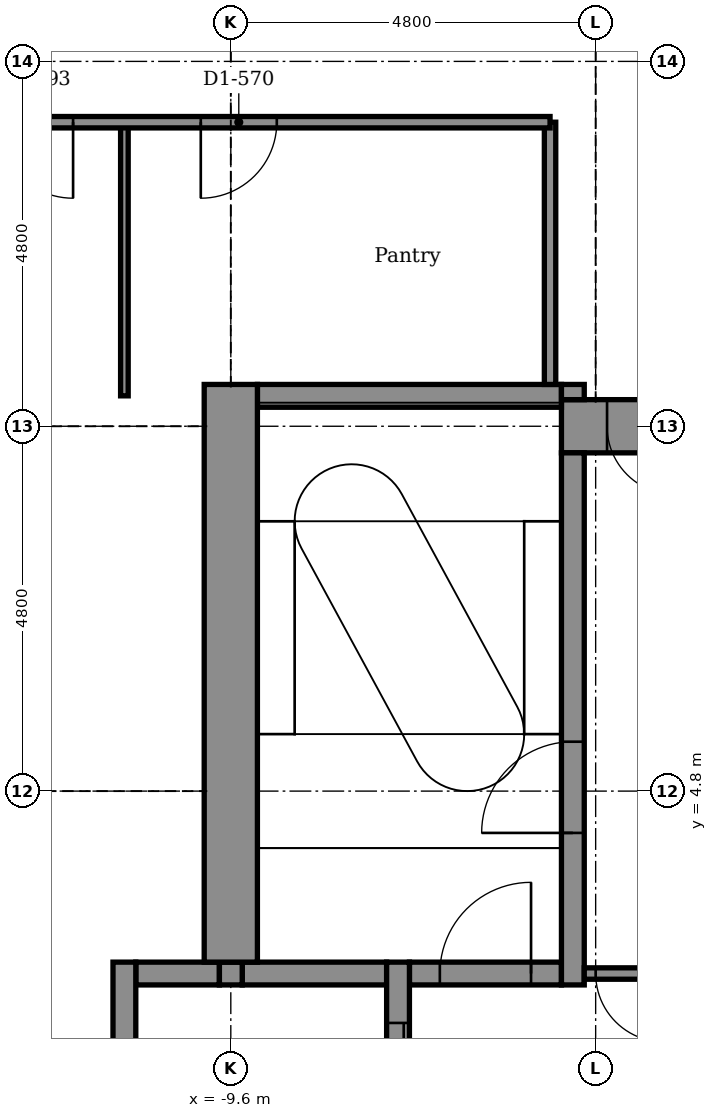
"""IFC4 building model, lengths in metres.
Left out: names, types, materials, properties, quantities, classifications, styles, units other than length and angle.
Written with IfcOpenShell. Run it as: python <this file> out.ifc"""

import sys

from ifc_helpers import new_model, si_unit, direction, frame, frame_2d, origin, place, context, subcontext, project, spatial, rectangle, extrude, element, fill, save


model = new_model("IFC4")
c1 = context("Model", 3, precision=1e-05, world=origin(), true_north=direction((0.0, 1.0)))
c2 = subcontext(c1, "Body", "Model", "MODEL_VIEW")
j1 = project(units=[si_unit("LENGTHUNIT", "METRE"), si_unit("PLANEANGLEUNIT", "RADIAN")], contexts=[c1])
p1 = place(None, origin())
s1 = spatial("IfcSite", under=j1, at=p1, CompositionType="ELEMENT")
p2 = place(p1, origin())
s2 = spatial("IfcBuilding", under=s1, at=p2, CompositionType="ELEMENT")
p3 = place(p2, frame((0.0, 0.0, 201.2)))
s3 = spatial("IfcBuildingStorey", under=s2, at=p3, CompositionType="ELEMENT", Elevation=201.2)
p4 = place(p3, frame((-10.85, 2.4, -0.15), z_axis=(0.0, 0.0, 1.0), x_axis=(1.0, 0.0, 0.0)))
e1 = element("IfcWall", 1, at=p4, inside=s3, PredefinedType="STANDARD", context=c2, shape_type="SweptSolid", body=[
    extrude(rectangle(XDim=1.1, YDim=0.3, at=frame_2d((0.55, 0.0))), origin(), (0.0, 0.0, 1.0), 3.9),
])
p5 = place(p3, frame((-9.45, 2.4, -0.15), z_axis=(0.0, 0.0, 1.0), x_axis=(1.0, 0.0, 0.0)))
e2 = element("IfcWall", 2, at=p5, inside=s3, PredefinedType="STANDARD", context=c2, shape_type="SweptSolid", body=[
    extrude(rectangle(XDim=1.9, YDim=0.3, at=frame_2d((0.95, 0.0))), origin(), (0.0, 0.0, 1.0), 3.9),
])
p6 = place(p3, frame((-7.25, 2.4, -0.15), z_axis=(0.0, 0.0, 1.0), x_axis=(1.0, 0.0, 0.0)))
e3 = element("IfcWall", 3, at=p6, inside=s3, PredefinedType="STANDARD", context=c2, shape_type="SweptSolid", body=[
    extrude(rectangle(XDim=2.0, YDim=0.3, at=frame_2d((1.0, 0.0))), origin(), (0.0, 0.0, 1.0), 3.9),
])
p7 = place(p6, frame((0.4, 0.0, 0.15)))
e4 = element("IfcOpeningElement", 4, at=p7, cuts=e3, PredefinedType="OPENING", context=c2, shape_type="SweptSolid", body=[
    extrude(rectangle(XDim=1.2, YDim=2.1, at=frame_2d((0.6, 1.05))), frame((0.0, 0.16, 0.0), z_axis=(0.0, -1.0, 0.0), x_axis=(1.0, 0.0, 0.0)), (0.0, 0.0, 1.0), 0.32),
])
p8 = place(p3, frame((-5.25, 9.6, -0.15), z_axis=(0.0, 0.0, 1.0), x_axis=(1.0, 0.0, 0.0)))
e5 = element("IfcWall", 5, at=p8, inside=s3, PredefinedType="SHEAR", context=c2, shape_type="SweptSolid", body=[
    extrude(rectangle(XDim=14.5, YDim=0.7, at=frame_2d((7.25, 0.0))), origin(), (0.0, 0.0, 1.0), 3.9),
])
p9 = place(p8, frame((0.6, 0.0, 0.15)))
e6 = element("IfcOpeningElement", 6, at=p9, cuts=e5, PredefinedType="OPENING", context=c2, shape_type="SweptSolid", body=[
    extrude(rectangle(XDim=0.9, YDim=2.1, at=frame_2d((0.45, 1.05))), frame((0.0, 0.36, 0.0), z_axis=(0.0, -1.0, 0.0), x_axis=(1.0, 0.0, 0.0)), (0.0, 0.0, 1.0), 0.72),
])
p10 = place(p3, frame((-9.25, 10.0, -0.15), z_axis=(0.0, 0.0, 1.0), x_axis=(1.0, 0.0, 0.0)))
e7 = element("IfcWall", 7, at=p10, inside=s3, PredefinedType="STANDARD", context=c2, shape_type="SweptSolid", body=[
    extrude(rectangle(XDim=4.0, YDim=0.3, at=frame_2d((2.0, 0.0))), origin(), (0.0, 0.0, 1.0), 3.9),
])
p11 = place(p3, frame((-11.0, -2.55, -0.15), z_axis=(0.0, 0.0, 1.0), x_axis=(0.0, 1.0, 0.0)))
e8 = element("IfcWall", 8, at=p11, inside=s3, PredefinedType="STANDARD", context=c2, shape_type="SweptSolid", body=[
    extrude(rectangle(XDim=5.1, YDim=0.3, at=frame_2d((2.55, 0.0))), origin(), (0.0, 0.0, 1.0), 3.9),
])
p12 = place(p3, frame((-9.6, 2.25, -0.15), z_axis=(0.0, 0.0, 1.0), x_axis=(0.0, 1.0, 0.0)))
e9 = element("IfcWall", 9, at=p12, inside=s3, PredefinedType="STANDARD", context=c2, shape_type="SweptSolid", body=[
    extrude(rectangle(XDim=0.3, YDim=0.3, at=frame_2d((0.15, 0.0))), origin(), (0.0, 0.0, 1.0), 3.9),
])
p13 = place(p3, frame((-9.6, 2.55, -0.15), z_axis=(0.0, 0.0, 1.0), x_axis=(0.0, 1.0, 0.0)))
e10 = element("IfcWall", 10, at=p13, inside=s3, PredefinedType="SHEAR", context=c2, shape_type="SweptSolid", body=[
    extrude(rectangle(XDim=7.6, YDim=0.7, at=frame_2d((3.8, 0.0))), origin(), (0.0, 0.0, 1.0), 3.9),
])
p14 = place(p3, frame((-7.4, -2.55, -0.15), z_axis=(0.0, 0.0, 1.0), x_axis=(0.0, 1.0, 0.0)))
e11 = element("IfcWall", 11, at=p14, inside=s3, PredefinedType="STANDARD", context=c2, shape_type="SweptSolid", body=[
    extrude(rectangle(XDim=5.1, YDim=0.3, at=frame_2d((2.55, 0.0))), origin(), (0.0, 0.0, 1.0), 3.9),
])
p15 = place(p14, frame((0.8, 0.0, 0.15)))
e12 = element("IfcOpeningElement", 12, at=p15, cuts=e11, PredefinedType="OPENING", context=c2, shape_type="SweptSolid", body=[
    extrude(rectangle(XDim=1.1, YDim=2.1, at=frame_2d((0.55, 1.05))), frame((0.0, 0.16, 0.0), z_axis=(0.0, -1.0, 0.0), x_axis=(1.0, 0.0, 0.0)), (0.0, 0.0, 1.0), 0.32),
])
p16 = place(p14, frame((3.2, 0.0, 0.15)))
e13 = element("IfcOpeningElement", 13, at=p16, cuts=e11, PredefinedType="OPENING", context=c2, shape_type="SweptSolid", body=[
    extrude(rectangle(XDim=1.1, YDim=2.1, at=frame_2d((0.55, 1.05))), frame((0.0, 0.16, 0.0), z_axis=(0.0, -1.0, 0.0), x_axis=(1.0, 0.0, 0.0)), (0.0, 0.0, 1.0), 0.32),
])
p17 = place(p3, frame((-5.1, 2.25, -0.15), z_axis=(0.0, 0.0, 1.0), x_axis=(0.0, 1.0, 0.0)))
e14 = element("IfcWall", 14, at=p17, inside=s3, PredefinedType="STANDARD", context=c2, shape_type="SweptSolid", body=[
    extrude(rectangle(XDim=7.0, YDim=0.3, at=frame_2d((3.5, 0.0))), origin(), (0.0, 0.0, 1.0), 3.9),
])
p18 = place(p17, frame((2.0, 0.0, 0.15)))
e15 = element("IfcOpeningElement", 15, at=p18, cuts=e14, PredefinedType="OPENING", context=c2, shape_type="SweptSolid", body=[
    extrude(rectangle(XDim=1.2, YDim=2.1, at=frame_2d((0.6, 1.05))), frame((0.0, 0.16, 0.0), z_axis=(0.0, -1.0, 0.0), x_axis=(1.0, 0.0, 0.0)), (0.0, 0.0, 1.0), 0.32),
])
p19 = place(p3, frame((-5.1, 9.95, -0.15), z_axis=(0.0, 0.0, 1.0), x_axis=(0.0, 1.0, 0.0)))
e16 = element("IfcWall", 16, at=p19, inside=s3, PredefinedType="STANDARD", context=c2, shape_type="SweptSolid", body=[
    extrude(rectangle(XDim=0.2, YDim=0.3, at=frame_2d((0.1, 0.0))), origin(), (0.0, 0.0, 1.0), 3.9),
])
p20 = place(p3, frame((-5.4, 10.15, 0.0), z_axis=(0.0, 0.0, 1.0), x_axis=(0.0, 1.0, 0.0)))
e17 = element("IfcWall", 17, at=p20, inside=s3, PredefinedType="PARTITIONING", context=c2, shape_type="SweptSolid", body=[
    extrude(rectangle(XDim=3.45, YDim=0.15, at=frame_2d((1.725, 0.0))), origin(), (0.0, 0.0, 1.0), 3.75),
])
p21 = place(p3, frame((-11.0, 10.0, 0.0), z_axis=(0.0, 0.0, 1.0), x_axis=(0.0, 1.0, 0.0)))
e18 = element("IfcWall", 18, at=p21, inside=s3, PredefinedType="PARTITIONING", context=c2, shape_type="SweptSolid", body=[
    extrude(rectangle(XDim=3.6, YDim=0.1, at=frame_2d((1.8, 0.0))), origin(), (0.0, 0.0, 1.0), 3.75),
])
p22 = place(p3, frame((-19.077, 13.6, 0.0), z_axis=(0.0, 0.0, 1.0), x_axis=(1.0, 0.0, 0.0)))
e19 = element("IfcWall", 19, at=p22, inside=s3, PredefinedType="PARTITIONING", context=c2, shape_type="SweptSolid", body=[
    extrude(rectangle(XDim=13.677, YDim=0.15, at=frame_2d((6.839, 0.0))), origin(), (0.0, 0.0, 1.0), 3.75),
])
p23 = place(p22, frame((9.083, 0.0, 0.0)))
e20 = element("IfcOpeningElement", 20, at=p23, cuts=e19, PredefinedType="OPENING", context=c2, shape_type="SweptSolid", body=[
    extrude(rectangle(XDim=1.0, YDim=2.1, at=frame_2d((0.5, 1.05))), frame((0.0, 0.085, 0.0), z_axis=(0.0, -1.0, 0.0), x_axis=(1.0, 0.0, 0.0)), (0.0, 0.0, 1.0), 0.17),
])
p24 = place(p22, frame((6.402, 0.0, 0.0)))
e21 = element("IfcOpeningElement", 21, at=p24, cuts=e19, PredefinedType="OPENING", context=c2, shape_type="SweptSolid", body=[
    extrude(rectangle(XDim=1.0, YDim=2.1, at=frame_2d((0.5, 1.05))), frame((0.0, 0.085, 0.0), z_axis=(0.0, -1.0, 0.0), x_axis=(1.0, 0.0, 0.0)), (0.0, 0.0, 1.0), 0.17),
])
p25 = place(p3, frame((-4.95, 2.4, 0.0), z_axis=(0.0, 0.0, 1.0), x_axis=(1.0, 0.0, 0.0)))
e22 = element("IfcWall", 22, at=p25, inside=s3, PredefinedType="PARTITIONING", context=c2, shape_type="SweptSolid", body=[
    extrude(rectangle(XDim=1.2, YDim=0.15, at=frame_2d((0.6, 0.0))), origin(), (0.0, 0.0, 1.0), 3.75),
])
p26 = place(p25, frame((0.15, 0.0, 0.0)))
e23 = element("IfcOpeningElement", 23, at=p26, cuts=e22, PredefinedType="OPENING", context=c2, shape_type="SweptSolid", body=[
    extrude(rectangle(XDim=0.9, YDim=2.1, at=frame_2d((0.45, 1.05))), frame((0.0, 0.085, 0.0), z_axis=(0.0, -1.0, 0.0), x_axis=(1.0, 0.0, 0.0)), (0.0, 0.0, 1.0), 0.17),
])
p27 = place(p23, frame((1.0, 0.0, 0.0), z_axis=(0.0, 0.0, 1.0), x_axis=(-1.0, 0.0, 0.0)))
e24 = element("IfcDoor", 24, at=p27, inside=s3, OperationType="SINGLE_SWING_LEFT", PredefinedType="DOOR", context=c2, shape_type="SweptSolid", body=[
    extrude(rectangle(XDim=1.0, YDim=2.1, at=frame_2d((0.5, 1.05))), frame((0.0, 0.025, 0.0), z_axis=(0.0, -1.0, 0.0), x_axis=(1.0, 0.0, 0.0)), (0.0, 0.0, 1.0), 0.05),
])
fill(e20, e24)
p28 = place(p24, frame((1.0, 0.0, 0.0), z_axis=(0.0, 0.0, 1.0), x_axis=(-1.0, 0.0, 0.0)))
e25 = element("IfcDoor", 25, at=p28, inside=s3, OperationType="SINGLE_SWING_RIGHT", PredefinedType="DOOR", context=c2, shape_type="SweptSolid", body=[
    extrude(rectangle(XDim=1.0, YDim=2.1, at=frame_2d((0.5, 1.05))), frame((0.0, 0.025, 0.0), z_axis=(0.0, -1.0, 0.0), x_axis=(1.0, 0.0, 0.0)), (0.0, 0.0, 1.0), 0.05),
])
fill(e21, e25)
p29 = place(p16, origin())
e26 = element("IfcDoor", 26, at=p29, inside=s3, OperationType="DOUBLE_DOOR_SLIDING", PredefinedType="DOOR", context=c2, shape_type="SweptSolid", body=[
    extrude(rectangle(XDim=1.1, YDim=2.1, at=frame_2d((0.55, 1.05))), frame((0.0, 0.025, 0.0), z_axis=(0.0, -1.0, 0.0), x_axis=(1.0, 0.0, 0.0)), (0.0, 0.0, 1.0), 0.05),
])
fill(e13, e26)
p30 = place(p18, origin())
e27 = element("IfcDoor", 27, at=p30, inside=s3, OperationType="SINGLE_SWING_LEFT", PredefinedType="DOOR", context=c2, shape_type="SweptSolid", body=[
    extrude(rectangle(XDim=1.2, YDim=2.1, at=frame_2d((0.6, 1.05))), frame((0.0, 0.025, 0.0), z_axis=(0.0, -1.0, 0.0), x_axis=(1.0, 0.0, 0.0)), (0.0, 0.0, 1.0), 0.05),
])
fill(e15, e27)
p31 = place(p9, frame((0.9, 0.0, 0.0), z_axis=(0.0, 0.0, 1.0), x_axis=(-1.0, 0.0, 0.0)))
e28 = element("IfcDoor", 28, at=p31, inside=s3, OperationType="SINGLE_SWING_RIGHT", PredefinedType="DOOR", context=c2, shape_type="SweptSolid", body=[
    extrude(rectangle(XDim=0.9, YDim=2.1, at=frame_2d((0.45, 1.05))), frame((0.0, 0.025, 0.0), z_axis=(0.0, -1.0, 0.0), x_axis=(1.0, 0.0, 0.0)), (0.0, 0.0, 1.0), 0.05),
])
fill(e6, e28)
p32 = place(p26, frame((0.9, 0.0, 0.0), z_axis=(0.0, 0.0, 1.0), x_axis=(-1.0, 0.0, 0.0)))
e29 = element("IfcDoor", 29, at=p32, inside=s3, OperationType="SINGLE_SWING_RIGHT", PredefinedType="DOOR", context=c2, shape_type="SweptSolid", body=[
    extrude(rectangle(XDim=0.9, YDim=2.1, at=frame_2d((0.45, 1.05))), frame((0.0, 0.025, 0.0), z_axis=(0.0, -1.0, 0.0), x_axis=(1.0, 0.0, 0.0)), (0.0, 0.0, 1.0), 0.05),
])
fill(e23, e29)
p33 = place(p7, origin())
e30 = element("IfcDoor", 30, at=p33, inside=s3, OperationType="SINGLE_SWING_RIGHT", PredefinedType="DOOR", context=c2, shape_type="SweptSolid", body=[
    extrude(rectangle(XDim=1.2, YDim=2.1, at=frame_2d((0.6, 1.05))), frame((0.0, 0.025, 0.0), z_axis=(0.0, -1.0, 0.0), x_axis=(1.0, 0.0, 0.0)), (0.0, 0.0, 1.0), 0.05),
])
fill(e4, e30)
save(model, sys.argv[1])
